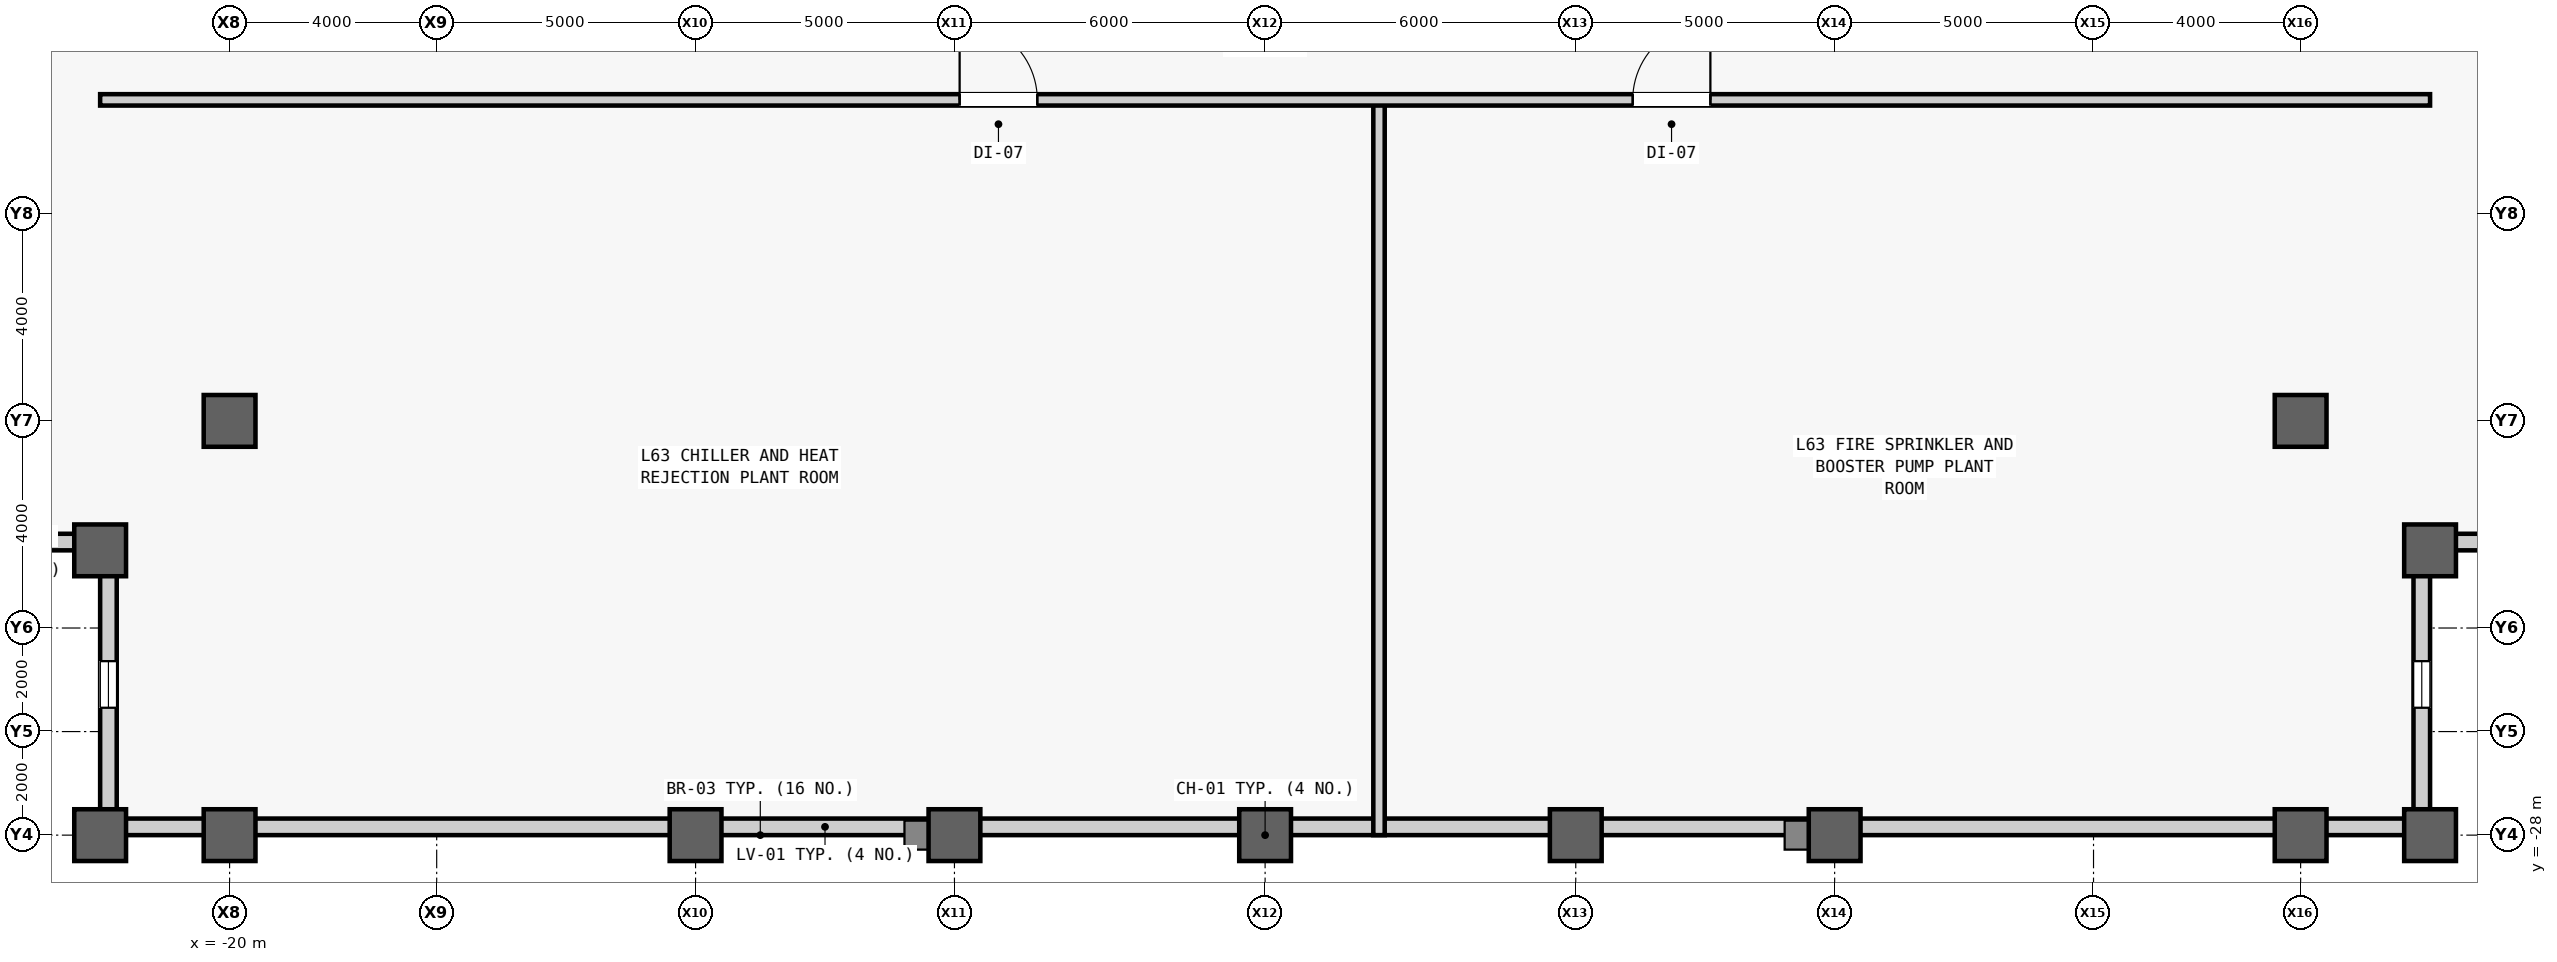
"""IFC4 building model, lengths in metres.
Left out: names, types, materials, properties, quantities, classifications, styles, units other than length and angle.
Written with IfcOpenShell. Run it as: python <this file> out.ifc"""

import sys

from ifc_helpers import new_model, si_unit, direction, frame, frame_2d, origin, origin_2d, place, context, subcontext, project, spatial, rectangle, hollow_rectangle, extrude, source, transform, mapped, element, fill, save


model = new_model("IFC4")
c1 = context("Model", 3, precision=1e-05, world=origin(), true_north=direction((0.0, 1.0)))
c2 = subcontext(c1, "Body", "Model", "MODEL_VIEW")
j1 = project(units=[si_unit("LENGTHUNIT", "METRE"), si_unit("PLANEANGLEUNIT", "RADIAN")], contexts=[c1])
p1 = place(None, origin())
s1 = spatial("IfcSite", under=j1, at=p1, CompositionType="ELEMENT")
p2 = place(p1, origin())
s2 = spatial("IfcBuilding", under=s1, at=p2, CompositionType="ELEMENT")
p3 = place(p2, frame((0.0, 0.0, 268.3)))
s3 = spatial("IfcBuildingStorey", under=s2, at=p3, CompositionType="ELEMENT", Elevation=268.3)
m1 = source(origin(), c2, "Body", "SweptSolid", [
    extrude(hollow_rectangle(XDim=1.0, YDim=1.0, WallThickness=0.055, at=origin_2d()), origin(), (0.0, 0.0, 1.0), 5.2),
])
for number, where, z_axis, x_axis in (
    (1, (-22.5, -28.0, 0.0), (0.0, 0.0, 1.0), (1.0, 0.0, 0.0)),
    (2, (-22.5, -22.5, 0.0), (0.0, 0.0, 1.0), (1.0, 0.0, 0.0)),
    (3, (-20.0, -28.0, 0.0), (0.0, 0.0, 1.0), (1.0, 0.0, 0.0)),
    (4, (-20.0, -20.0, 0.0), (0.0, 0.0, 1.0), (1.0, 0.0, 0.0)),
    (5, (-11.0, -28.0, 0.0), (0.0, 0.0, 1.0), (1.0, 0.0, 0.0)),
    (6, (-6.0, -28.0, 0.0), (0.0, 0.0, 1.0), (1.0, 0.0, 0.0)),
    (7, (0.0, -28.0, 0.0), (0.0, 0.0, 1.0), (1.0, 0.0, 0.0)),
    (8, (6.0, -28.0, 0.0), (0.0, 0.0, 1.0), (1.0, 0.0, 0.0)),
    (9, (11.0, -28.0, 0.0), (0.0, 0.0, 1.0), (1.0, 0.0, 0.0)),
    (10, (20.0, -28.0, 0.0), (0.0, 0.0, 1.0), (1.0, 0.0, 0.0)),
    (11, (20.0, -20.0, 0.0), (0.0, 0.0, 1.0), (1.0, 0.0, 0.0)),
    (12, (22.5, -28.0, 0.0), (0.0, 0.0, 1.0), (1.0, 0.0, 0.0)),
    (13, (22.5, -22.5, 0.0), (0.0, 0.0, 1.0), (1.0, 0.0, 0.0)),
):
    element("IfcColumn", number, at=place(p3, frame(where, z_axis=z_axis, x_axis=x_axis)), inside=s3, PredefinedType="COLUMN", context=c2, shape_type="MappedRepresentation", body=[
        mapped(m1, transform((0.0, 0.0, 0.0), scale=1.0)),
    ])
m2 = source(origin(), c2, "Body", "SweptSolid", [
    extrude(rectangle(XDim=5.18, YDim=0.32, at=frame_2d((2.59, 0.0))), origin(), (0.0, 0.0, 1.0), 4.364),
])
p4 = place(p3, frame((-22.5, -22.34, 0.0), z_axis=(0.0, 0.0, 1.0), x_axis=(-1.0, 0.0, 0.0)))
e14 = element("IfcWall", 14, at=p4, inside=s3, PredefinedType="STANDARD", context=c2, shape_type="MappedRepresentation", body=[
    mapped(m2, transform((0.0, 0.0, 0.0), scale=1.0)),
])
m3 = source(origin(), c2, "Body", "SweptSolid", [
    extrude(rectangle(XDim=0.9, YDim=2.4, at=frame_2d((0.45, 1.2))), frame((0.0, 0.17, 0.0), z_axis=(0.0, -1.0, 0.0), x_axis=(1.0, 0.0, 0.0)), (0.0, 0.0, 1.0), 0.34),
])
p5 = place(p4, frame((2.14, 0.0, 0.7)))
e15 = element("IfcOpeningElement", 15, at=p5, cuts=e14, PredefinedType="OPENING", context=c2, shape_type="MappedRepresentation", body=[
    mapped(m3, transform((0.0, 0.0, 0.0), scale=1.0)),
])
m4 = source(origin(), c2, "Body", "SweptSolid", [
    extrude(rectangle(XDim=5.18, YDim=0.32, at=frame_2d((2.59, 0.0))), origin(), (0.0, 0.0, 1.0), 4.284),
])
p6 = place(p3, frame((-22.34, -27.68, 0.0), z_axis=(0.0, 0.0, 1.0), x_axis=(0.0, 1.0, 0.0)))
e16 = element("IfcWall", 16, at=p6, inside=s3, PredefinedType="STANDARD", context=c2, shape_type="MappedRepresentation", body=[
    mapped(m4, transform((0.0, 0.0, 0.0), scale=1.0)),
])
p7 = place(p6, frame((2.14, 0.0, 0.7)))
e17 = element("IfcOpeningElement", 17, at=p7, cuts=e16, PredefinedType="OPENING", context=c2, shape_type="MappedRepresentation", body=[
    mapped(m3, transform((0.0, 0.0, 0.0), scale=1.0)),
])
p8 = place(p3, frame((22.34, -27.68, 0.0), z_axis=(0.0, 0.0, 1.0), x_axis=(0.0, 1.0, 0.0)))
e18 = element("IfcWall", 18, at=p8, inside=s3, PredefinedType="STANDARD", context=c2, shape_type="MappedRepresentation", body=[
    mapped(m4, transform((0.0, 0.0, 0.0), scale=1.0)),
])
p9 = place(p8, frame((2.14, 0.0, 0.7)))
e19 = element("IfcOpeningElement", 19, at=p9, cuts=e18, PredefinedType="OPENING", context=c2, shape_type="MappedRepresentation", body=[
    mapped(m3, transform((0.0, 0.0, 0.0), scale=1.0)),
])
p10 = place(p3, frame((22.5, -22.34, 0.0), z_axis=(0.0, 0.0, 1.0), x_axis=(1.0, 0.0, 0.0)))
e20 = element("IfcWall", 20, at=p10, inside=s3, PredefinedType="STANDARD", context=c2, shape_type="MappedRepresentation", body=[
    mapped(m2, transform((0.0, 0.0, 0.0), scale=1.0)),
])
p11 = place(p10, frame((2.14, 0.0, 0.7)))
e21 = element("IfcOpeningElement", 21, at=p11, cuts=e20, PredefinedType="OPENING", context=c2, shape_type="MappedRepresentation", body=[
    mapped(m3, transform((0.0, 0.0, 0.0), scale=1.0)),
])
m5 = source(origin(), c2, "Body", "SweptSolid", [
    extrude(rectangle(XDim=45.0, YDim=0.32, at=frame_2d((22.5, 0.0))), origin(), (0.0, 0.0, 1.0), 4.284),
])
p12 = place(p3, frame((-22.5, -27.84, 0.0), z_axis=(0.0, 0.0, 1.0), x_axis=(1.0, 0.0, 0.0)))
e22 = element("IfcWall", 22, at=p12, inside=s3, PredefinedType="STANDARD", context=c2, shape_type="MappedRepresentation", body=[
    mapped(m5, transform((0.0, 0.0, 0.0), scale=1.0)),
])
m6 = source(origin(), c2, "Body", "SweptSolid", [
    extrude(rectangle(XDim=14.2, YDim=0.22, at=frame_2d((7.1, 0.0))), origin(), (0.0, 0.0, 1.0), 4.98),
])
p13 = place(p3, frame((2.2, -28.0, 0.0), z_axis=(0.0, 0.0, 1.0), x_axis=(0.0, 1.0, 0.0)))
e23 = element("IfcWall", 23, at=p13, inside=s3, PredefinedType="PARTITIONING", context=c2, shape_type="MappedRepresentation", body=[
    mapped(m6, transform((0.0, 0.0, 0.0), scale=1.0)),
])
m7 = source(origin(), c2, "Body", "SweptSolid", [
    extrude(rectangle(XDim=45.0, YDim=0.22, at=frame_2d((22.5, 0.0))), origin(), (0.0, 0.0, 1.0), 4.98),
])
p14 = place(p3, frame((-22.5, -13.8, 0.0), z_axis=(0.0, 0.0, 1.0), x_axis=(1.0, 0.0, 0.0)))
e24 = element("IfcWall", 24, at=p14, inside=s3, PredefinedType="PARTITIONING", context=c2, shape_type="MappedRepresentation", body=[
    mapped(m7, transform((0.0, 0.0, 0.0), scale=1.0)),
])
m8 = source(origin(), c2, "Body", "SweptSolid", [
    extrude(rectangle(XDim=1.5, YDim=2.3, at=frame_2d((0.75, 1.15))), frame((0.0, 0.12, 0.0), z_axis=(0.0, -1.0, 0.0), x_axis=(1.0, 0.0, 0.0)), (0.0, 0.0, 1.0), 0.24),
])
p15 = place(p14, frame((16.6, 0.0, 0.0)))
e25 = element("IfcOpeningElement", 25, at=p15, cuts=e24, PredefinedType="OPENING", context=c2, shape_type="MappedRepresentation", body=[
    mapped(m8, transform((0.0, 0.0, 0.0), scale=1.0)),
])
p16 = place(p14, frame((29.6, 0.0, 0.0)))
e26 = element("IfcOpeningElement", 26, at=p16, cuts=e24, PredefinedType="OPENING", context=c2, shape_type="MappedRepresentation", body=[
    mapped(m8, transform((0.0, 0.0, 0.0), scale=1.0)),
])
m9 = source(origin(), c2, "Body", "SweptSolid", [
    extrude(rectangle(XDim=0.9, YDim=2.4, at=frame_2d((0.45, 1.2))), frame((0.0, 0.03, 0.0), z_axis=(0.0, -1.0, 0.0), x_axis=(1.0, 0.0, 0.0)), (0.0, 0.0, 1.0), 0.06),
])
p17 = place(p7, origin())
e27 = element("IfcWindow", 27, at=p17, inside=s3, PartitioningType="SINGLE_PANEL", PredefinedType="WINDOW", context=c2, shape_type="MappedRepresentation", body=[
    mapped(m9, transform((0.0, 0.0, 0.0), scale=1.0)),
])
fill(e17, e27)
p18 = place(p9, origin())
e28 = element("IfcWindow", 28, at=p18, inside=s3, PartitioningType="SINGLE_PANEL", PredefinedType="WINDOW", context=c2, shape_type="MappedRepresentation", body=[
    mapped(m9, transform((0.0, 0.0, 0.0), scale=1.0)),
])
fill(e19, e28)
m10 = source(origin(), c2, "Body", "SweptSolid", [
    extrude(rectangle(XDim=1.5, YDim=2.3, at=frame_2d((0.75, 1.15))), frame((0.0, 0.025, 0.0), z_axis=(0.0, -1.0, 0.0), x_axis=(1.0, 0.0, 0.0)), (0.0, 0.0, 1.0), 0.05),
])
p19 = place(p15, origin())
e29 = element("IfcDoor", 29, at=p19, inside=s3, OperationType="SINGLE_SWING_LEFT", PredefinedType="DOOR", context=c2, shape_type="MappedRepresentation", body=[
    mapped(m10, transform((0.0, 0.0, 0.0), scale=1.0)),
])
fill(e25, e29)
p20 = place(p16, origin())
e30 = element("IfcDoor", 30, at=p20, inside=s3, OperationType="SINGLE_SWING_RIGHT", PredefinedType="DOOR", context=c2, shape_type="MappedRepresentation", body=[
    mapped(m10, transform((0.0, 0.0, 0.0), scale=1.0)),
])
fill(e26, e30)
save(model, sys.argv[1])
